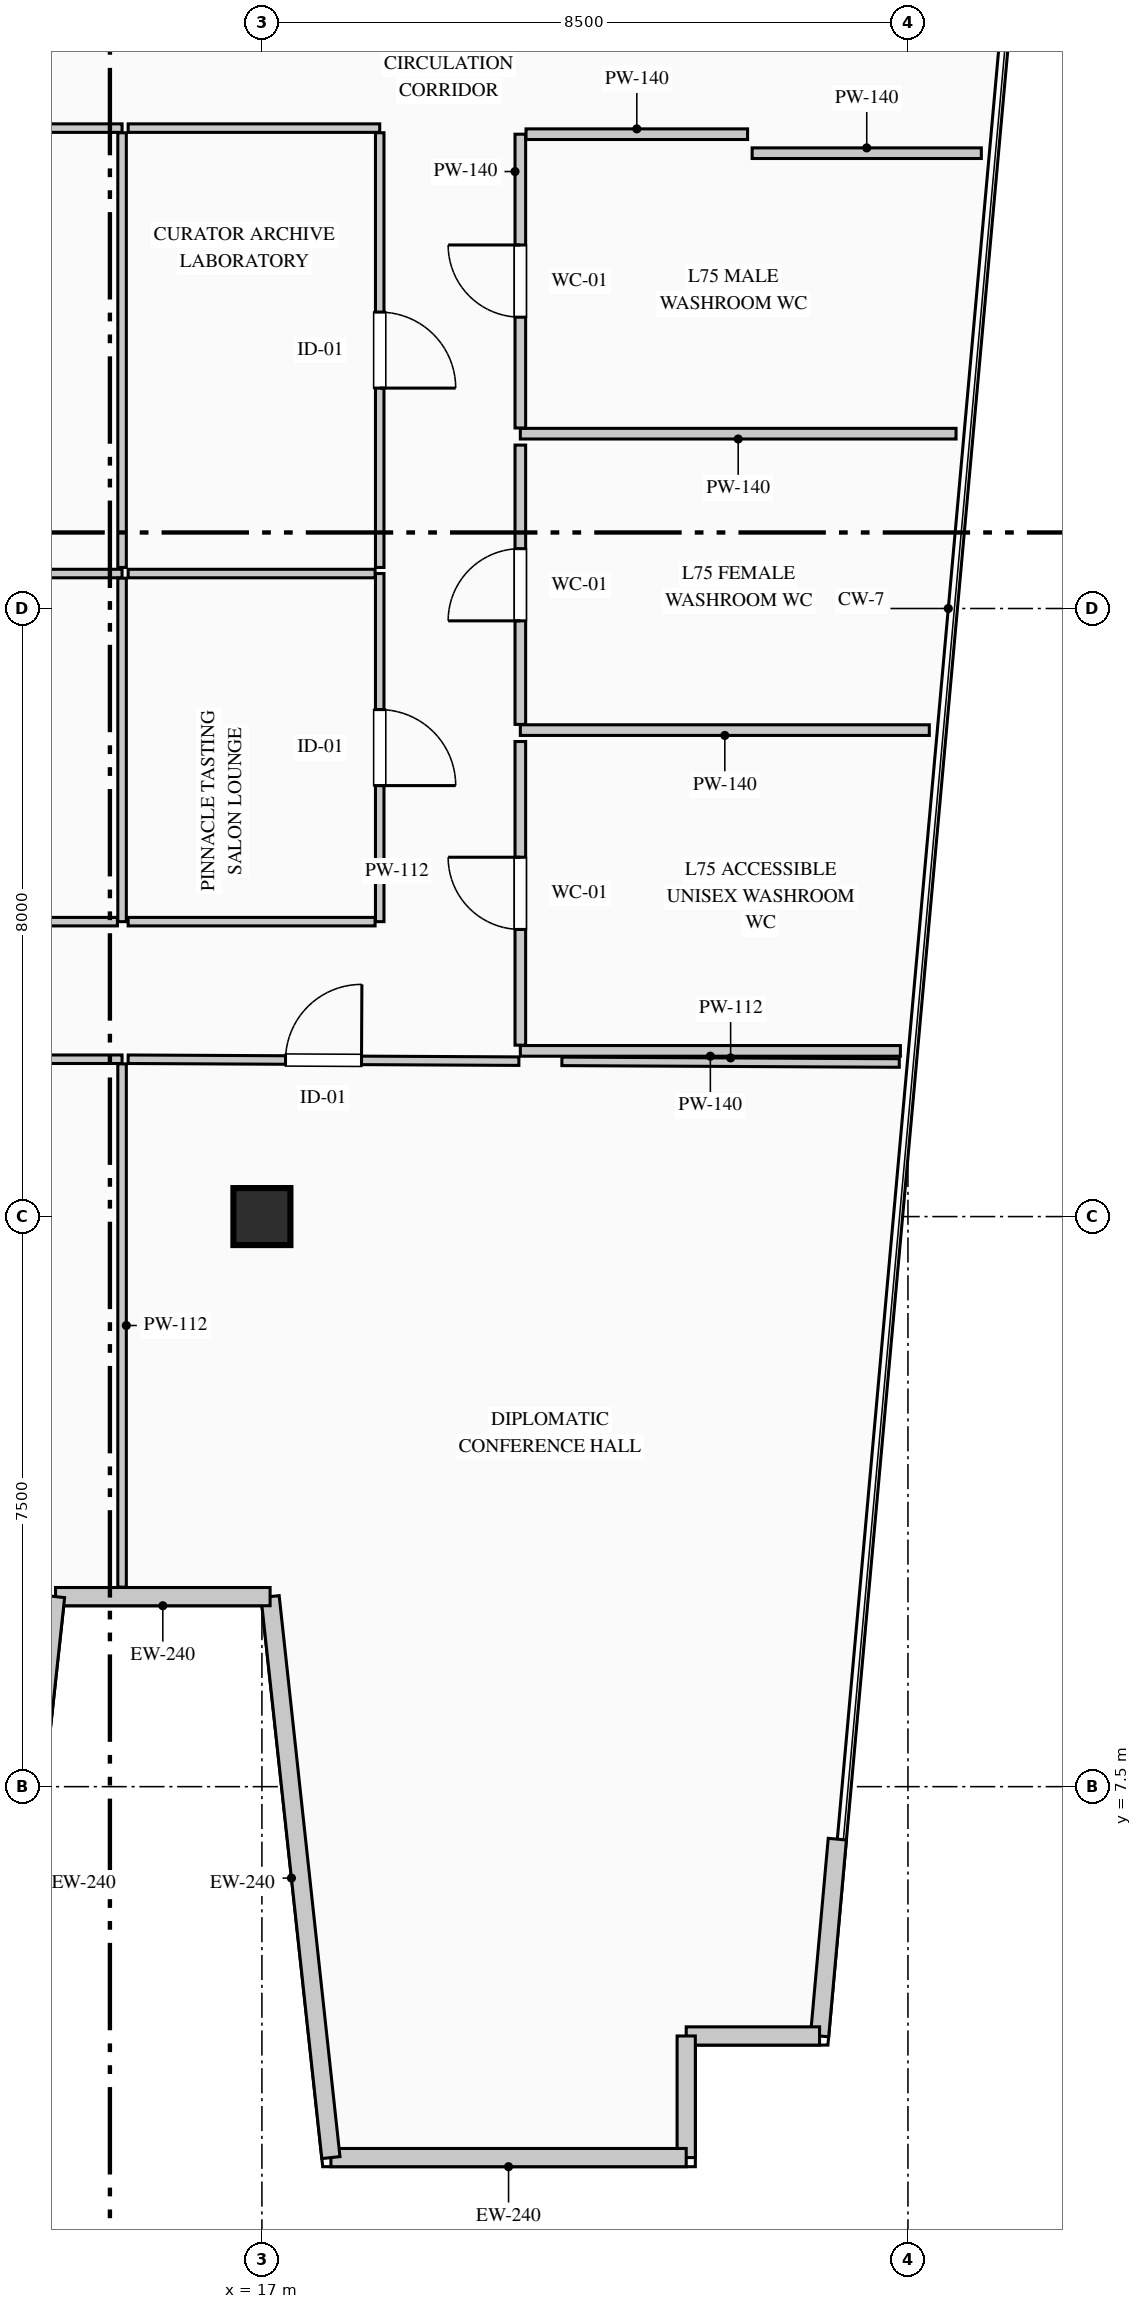
"""IFC4 building model, lengths in metres.
Left out: names, types, materials, properties, quantities, classifications, styles, units other than length and angle.
Written with IfcOpenShell. Run it as: python <this file> out.ifc"""

import sys

from ifc_helpers import new_model, si_unit, direction, frame, frame_2d, origin, origin_2d, place, context, subcontext, project, spatial, rectangle, extrude, element, fill, save


model = new_model("IFC4")
c1 = context("Model", 3, precision=1e-05, world=origin(), true_north=direction((0.0, 1.0)))
c2 = subcontext(c1, "Body", "Model", "MODEL_VIEW")
j1 = project(units=[si_unit("LENGTHUNIT", "METRE"), si_unit("PLANEANGLEUNIT", "RADIAN")], contexts=[c1])
p1 = place(None, origin())
s1 = spatial("IfcSite", under=j1, at=p1, CompositionType="ELEMENT")
p2 = place(p1, origin())
s2 = spatial("IfcBuilding", under=s1, at=p2, CompositionType="ELEMENT")
p3 = place(p2, frame((0.0, 0.0, 312.0)))
s3 = spatial("IfcBuildingStorey", under=s2, at=p3, CompositionType="ELEMENT", Elevation=312.0)
p4 = place(p3, frame((17.0, 15.0, 0.0), z_axis=(0.0, 0.0, 1.0), x_axis=(1.0, 0.0, 0.0)))
e1 = element("IfcColumn", 1, at=p4, inside=s3, PredefinedType="COLUMN", context=c2, shape_type="SweptSolid", body=[
    extrude(rectangle(XDim=0.75, YDim=0.75, at=origin_2d()), origin(), (0.0, 0.0, 1.0), 3.95),
])
p5 = place(p3, frame((24.571, 6.81, 0.0), z_axis=(0.0, 0.0, 1.0), x_axis=(-0.089765303723, -0.995962946222, 0.0)))
e2 = element("IfcWall", 2, at=p5, inside=s3, PredefinedType="STANDARD", context=c2, shape_type="SweptSolid", body=[
    extrude(rectangle(XDim=2.6, YDim=0.24, at=frame_2d((1.3, 0.0))), origin(), (0.0, 0.0, 1.0), 3.7),
])
p6 = place(p3, frame((24.337, 4.22, 0.0), z_axis=(0.0, 0.0, 1.0), x_axis=(-1.0, 0.0, 0.0)))
e3 = element("IfcWall", 3, at=p6, inside=s3, PredefinedType="STANDARD", context=c2, shape_type="SweptSolid", body=[
    extrude(rectangle(XDim=1.755, YDim=0.24, at=frame_2d((0.877, 0.0))), origin(), (0.0, 0.0, 1.0), 3.7),
])
p7 = place(p3, frame((22.583, 4.22, 0.0), z_axis=(0.0, 0.0, 1.0), x_axis=(0.0, -1.0, 0.0)))
e4 = element("IfcWall", 4, at=p7, inside=s3, PredefinedType="STANDARD", context=c2, shape_type="SweptSolid", body=[
    extrude(rectangle(XDim=1.6, YDim=0.24, at=frame_2d((0.8, 0.0))), origin(), (0.0, 0.0, 1.0), 3.7),
])
p8 = place(p3, frame((22.583, 2.62, 0.0), z_axis=(0.0, 0.0, 1.0), x_axis=(-1.0, 0.0, 0.0)))
e5 = element("IfcWall", 5, at=p8, inside=s3, PredefinedType="STANDARD", context=c2, shape_type="SweptSolid", body=[
    extrude(rectangle(XDim=4.675, YDim=0.24, at=frame_2d((2.337, 0.0))), origin(), (0.0, 0.0, 1.0), 3.7),
])
p9 = place(p3, frame((17.908, 2.62, 0.0), z_axis=(0.0, 0.0, 1.0), x_axis=(-0.107777936076, 0.994174992894, 0.0)))
e6 = element("IfcWall", 6, at=p9, inside=s3, PredefinedType="STANDARD", context=c2, shape_type="SweptSolid", body=[
    extrude(rectangle(XDim=7.423, YDim=0.24, at=frame_2d((3.711, 0.0))), origin(), (0.0, 0.0, 1.0), 3.7),
])
p10 = place(p3, frame((17.108, 10.0, 0.0), z_axis=(0.0, 0.0, 1.0), x_axis=(-1.0, 0.0, 0.0)))
e7 = element("IfcWall", 7, at=p10, inside=s3, PredefinedType="STANDARD", context=c2, shape_type="SweptSolid", body=[
    extrude(rectangle(XDim=2.823, YDim=0.24, at=frame_2d((1.411, 0.0))), origin(), (0.0, 0.0, 1.0), 3.7),
])
p11 = place(p3, frame((14.285, 10.0, 0.0), z_axis=(0.0, 0.0, 1.0), x_axis=(-0.107777936076, -0.994174992894, 0.0)))
e8 = element("IfcWall", 8, at=p11, inside=s3, PredefinedType="STANDARD", context=c2, shape_type="SweptSolid", body=[
    extrude(rectangle(XDim=7.423, YDim=0.24, at=frame_2d((3.711, 0.0))), origin(), (0.0, 0.0, 1.0), 3.7),
])
p12 = place(p11, frame((3.926, 0.0, 0.9)))
e9 = element("IfcOpeningElement", 9, at=p12, cuts=e8, PredefinedType="OPENING", context=c2, shape_type="SweptSolid", body=[
    extrude(rectangle(XDim=1.65, YDim=1.95, at=frame_2d((0.825, 0.975))), frame((0.0, 0.13, 0.0), z_axis=(0.0, -1.0, 0.0), x_axis=(1.0, 0.0, 0.0)), (0.0, 0.0, 1.0), 0.26),
])
p13 = place(p3, frame((23.45, 28.99, 0.0), z_axis=(0.0, 0.0, 1.0), x_axis=(1.0, 0.0, 0.0)))
e10 = element("IfcWall", 10, at=p13, inside=s3, PredefinedType="PARTITIONING", context=c2, shape_type="SweptSolid", body=[
    extrude(rectangle(XDim=3.016, YDim=0.14, at=frame_2d((1.508, 0.0))), origin(), (0.0, 0.0, 1.0), 3.7),
])
p14 = place(p3, frame((26.133, 25.3, 0.0), z_axis=(0.0, 0.0, 1.0), x_axis=(-1.0, 0.0, 0.0)))
e11 = element("IfcWall", 11, at=p14, inside=s3, PredefinedType="PARTITIONING", context=c2, shape_type="SweptSolid", body=[
    extrude(rectangle(XDim=5.733, YDim=0.14, at=frame_2d((2.866, 0.0))), origin(), (0.0, 0.0, 1.0), 3.7),
])
p15 = place(p3, frame((20.4, 25.375, 0.0), z_axis=(0.0, 0.0, 1.0), x_axis=(0.0, 1.0, 0.0)))
e12 = element("IfcWall", 12, at=p15, inside=s3, PredefinedType="PARTITIONING", context=c2, shape_type="SweptSolid", body=[
    extrude(rectangle(XDim=3.865, YDim=0.14, at=frame_2d((1.933, 0.0))), origin(), (0.0, 0.0, 1.0), 3.7),
])
p16 = place(p15, frame((1.458, 0.0, 0.0)))
e13 = element("IfcOpeningElement", 13, at=p16, cuts=e12, PredefinedType="OPENING", context=c2, shape_type="SweptSolid", body=[
    extrude(rectangle(XDim=0.95, YDim=2.15, at=frame_2d((0.475, 1.075))), frame((0.0, 0.08, 0.0), z_axis=(0.0, -1.0, 0.0), x_axis=(1.0, 0.0, 0.0)), (0.0, 0.0, 1.0), 0.16),
])
p17 = place(p3, frame((20.475, 29.24, 0.0), z_axis=(0.0, 0.0, 1.0), x_axis=(1.0, 0.0, 0.0)))
e14 = element("IfcWall", 14, at=p17, inside=s3, PredefinedType="PARTITIONING", context=c2, shape_type="SweptSolid", body=[
    extrude(rectangle(XDim=2.915, YDim=0.14, at=frame_2d((1.458, 0.0))), origin(), (0.0, 0.0, 1.0), 3.7),
])
p18 = place(p3, frame((25.781, 21.4, 0.0), z_axis=(0.0, 0.0, 1.0), x_axis=(-1.0, 0.0, 0.0)))
e15 = element("IfcWall", 15, at=p18, inside=s3, PredefinedType="PARTITIONING", context=c2, shape_type="SweptSolid", body=[
    extrude(rectangle(XDim=5.381, YDim=0.14, at=frame_2d((2.69, 0.0))), origin(), (0.0, 0.0, 1.0), 3.7),
])
p19 = place(p3, frame((20.4, 21.475, 0.0), z_axis=(0.0, 0.0, 1.0), x_axis=(0.0, 1.0, 0.0)))
e16 = element("IfcWall", 16, at=p19, inside=s3, PredefinedType="PARTITIONING", context=c2, shape_type="SweptSolid", body=[
    extrude(rectangle(XDim=3.675, YDim=0.14, at=frame_2d((1.837, 0.0))), origin(), (0.0, 0.0, 1.0), 3.7),
])
p20 = place(p19, frame((1.363, 0.0, 0.0)))
e17 = element("IfcOpeningElement", 17, at=p20, cuts=e16, PredefinedType="OPENING", context=c2, shape_type="SweptSolid", body=[
    extrude(rectangle(XDim=0.95, YDim=2.15, at=frame_2d((0.475, 1.075))), frame((0.0, 0.08, 0.0), z_axis=(0.0, -1.0, 0.0), x_axis=(1.0, 0.0, 0.0)), (0.0, 0.0, 1.0), 0.16),
])
p21 = place(p3, frame((25.4, 17.18, 0.0), z_axis=(0.0, 0.0, 1.0), x_axis=(-1.0, 0.0, 0.0)))
e18 = element("IfcWall", 18, at=p21, inside=s3, PredefinedType="PARTITIONING", context=c2, shape_type="SweptSolid", body=[
    extrude(rectangle(XDim=5.0, YDim=0.14, at=frame_2d((2.5, 0.0))), origin(), (0.0, 0.0, 1.0), 3.7),
])
p22 = place(p3, frame((20.4, 17.255, 0.0), z_axis=(0.0, 0.0, 1.0), x_axis=(0.0, 1.0, 0.0)))
e19 = element("IfcWall", 19, at=p22, inside=s3, PredefinedType="PARTITIONING", context=c2, shape_type="SweptSolid", body=[
    extrude(rectangle(XDim=3.995, YDim=0.14, at=frame_2d((1.998, 0.0))), origin(), (0.0, 0.0, 1.0), 3.7),
])
p23 = place(p22, frame((1.522, 0.0, 0.0)))
e20 = element("IfcOpeningElement", 20, at=p23, cuts=e19, PredefinedType="OPENING", context=c2, shape_type="SweptSolid", body=[
    extrude(rectangle(XDim=0.95, YDim=2.15, at=frame_2d((0.475, 1.075))), frame((0.0, 0.08, 0.0), z_axis=(0.0, -1.0, 0.0), x_axis=(1.0, 0.0, 0.0)), (0.0, 0.0, 1.0), 0.16),
])
p24 = place(p3, frame((4.451, 17.07, 0.0), z_axis=(0.0, 0.0, 1.0), x_axis=(1.0, 0.0, 0.0)))
e21 = element("IfcWall", 21, at=p24, inside=s3, PredefinedType="PARTITIONING", context=c2, shape_type="SweptSolid", body=[
    extrude(rectangle(XDim=10.708, YDim=0.112, at=frame_2d((5.354, 0.0))), origin(), (0.0, 0.0, 1.0), 3.7),
])
p25 = place(p24, frame((4.854, 0.0, 0.0)))
e22 = element("IfcOpeningElement", 22, at=p25, cuts=e21, PredefinedType="OPENING", context=c2, shape_type="SweptSolid", body=[
    extrude(rectangle(XDim=1.0, YDim=2.15, at=frame_2d((0.5, 1.075))), frame((0.0, 0.066, 0.0), z_axis=(0.0, -1.0, 0.0), x_axis=(1.0, 0.0, 0.0)), (0.0, 0.0, 1.0), 0.132),
])
p26 = place(p3, frame((15.16, 17.009, 0.0), z_axis=(0.0, 0.0, 1.0), x_axis=(0.0, -1.0, 0.0)))
e23 = element("IfcWall", 23, at=p26, inside=s3, PredefinedType="PARTITIONING", context=c2, shape_type="SweptSolid", body=[
    extrude(rectangle(XDim=6.884, YDim=0.112, at=frame_2d((3.442, 0.0))), origin(), (0.0, 0.0, 1.0), 3.7),
])
p27 = place(p3, frame((20.947, 17.042, 0.0), z_axis=(0.0, 0.0, 1.0), x_axis=(0.999988019942, -0.004894892409, 0.0)))
e24 = element("IfcWall", 24, at=p27, inside=s3, PredefinedType="PARTITIONING", context=c2, shape_type="SweptSolid", body=[
    extrude(rectangle(XDim=4.439, YDim=0.112, at=frame_2d((2.219, 0.0))), origin(), (0.0, 0.0, 1.0), 3.7),
])
p28 = place(p3, frame((15.24, 17.07, 0.0), z_axis=(0.0, 0.0, 1.0), x_axis=(0.999988036902, -0.0048914265, 0.0)))
e25 = element("IfcWall", 25, at=p28, inside=s3, PredefinedType="PARTITIONING", context=c2, shape_type="SweptSolid", body=[
    extrude(rectangle(XDim=5.141, YDim=0.112, at=frame_2d((2.57, 0.0))), origin(), (0.0, 0.0, 1.0), 3.7),
])
p29 = place(p28, frame((2.071, 0.0, 0.0)))
e26 = element("IfcOpeningElement", 26, at=p29, cuts=e25, PredefinedType="OPENING", context=c2, shape_type="SweptSolid", body=[
    extrude(rectangle(XDim=1.0, YDim=2.15, at=frame_2d((0.5, 1.075))), frame((0.0, 0.066, 0.0), z_axis=(0.0, -1.0, 0.0), x_axis=(1.0, 0.0, 0.0)), (0.0, 0.0, 1.0), 0.132),
])
p30 = place(p3, frame((6.171, 23.46, 0.0), z_axis=(0.0, 0.0, 1.0), x_axis=(1.0, 0.0, 0.0)))
e27 = element("IfcWall", 27, at=p30, inside=s3, PredefinedType="PARTITIONING", context=c2, shape_type="SweptSolid", body=[
    extrude(rectangle(XDim=8.989, YDim=0.112, at=frame_2d((4.495, 0.0))), origin(), (0.0, 0.0, 1.0), 3.7),
])
p31 = place(p3, frame((15.16, 23.399, 0.0), z_axis=(0.0, 0.0, 1.0), x_axis=(0.0, -1.0, 0.0)))
e28 = element("IfcWall", 28, at=p31, inside=s3, PredefinedType="PARTITIONING", context=c2, shape_type="SweptSolid", body=[
    extrude(rectangle(XDim=4.519, YDim=0.112, at=frame_2d((2.26, 0.0))), origin(), (0.0, 0.0, 1.0), 3.7),
])
p32 = place(p3, frame((15.099, 18.88, 0.0), z_axis=(0.0, 0.0, 1.0), x_axis=(-1.0, 0.0, 0.0)))
e29 = element("IfcWall", 29, at=p32, inside=s3, PredefinedType="PARTITIONING", context=c2, shape_type="SweptSolid", body=[
    extrude(rectangle(XDim=8.928, YDim=0.112, at=frame_2d((4.464, 0.0))), origin(), (0.0, 0.0, 1.0), 3.7),
])
p33 = place(p32, frame((3.964, 0.0, 0.0)))
e30 = element("IfcOpeningElement", 30, at=p33, cuts=e29, PredefinedType="OPENING", context=c2, shape_type="SweptSolid", body=[
    extrude(rectangle(XDim=1.0, YDim=2.15, at=frame_2d((0.5, 1.075))), frame((0.0, 0.066, 0.0), z_axis=(0.0, -1.0, 0.0), x_axis=(1.0, 0.0, 0.0)), (0.0, 0.0, 1.0), 0.132),
])
p34 = place(p3, frame((18.55, 23.46, 0.0), z_axis=(0.0, 0.0, 1.0), x_axis=(0.0, -1.0, 0.0)))
e31 = element("IfcWall", 31, at=p34, inside=s3, PredefinedType="PARTITIONING", context=c2, shape_type="SweptSolid", body=[
    extrude(rectangle(XDim=4.58, YDim=0.112, at=frame_2d((2.29, 0.0))), origin(), (0.0, 0.0, 1.0), 3.7),
])
p35 = place(p34, frame((1.79, 0.0, 0.0)))
e32 = element("IfcOpeningElement", 32, at=p35, cuts=e31, PredefinedType="OPENING", context=c2, shape_type="SweptSolid", body=[
    extrude(rectangle(XDim=1.0, YDim=2.15, at=frame_2d((0.5, 1.075))), frame((0.0, 0.066, 0.0), z_axis=(0.0, -1.0, 0.0), x_axis=(1.0, 0.0, 0.0)), (0.0, 0.0, 1.0), 0.132),
])
for number, where, z_axis, x_axis in (
    (33, (18.489, 18.88, 0.0), (0.0, 0.0, 1.0), (-1.0, 0.0, 0.0)),
    (34, (15.24, 23.46, 0.0), (0.0, 0.0, 1.0), (1.0, 0.0, 0.0)),
):
    element("IfcWall", number, at=place(p3, frame(where, z_axis=z_axis, x_axis=x_axis)), inside=s3, PredefinedType="PARTITIONING", context=c2, shape_type="SweptSolid", body=[
        extrude(rectangle(XDim=3.249, YDim=0.112, at=frame_2d((1.625, 0.0))), origin(), (0.0, 0.0, 1.0), 3.7),
    ])
p36 = place(p3, frame((6.171, 29.32, 0.0), z_axis=(0.0, 0.0, 1.0), x_axis=(1.0, 0.0, 0.0)))
e35 = element("IfcWall", 35, at=p36, inside=s3, PredefinedType="PARTITIONING", context=c2, shape_type="SweptSolid", body=[
    extrude(rectangle(XDim=8.989, YDim=0.112, at=frame_2d((4.495, 0.0))), origin(), (0.0, 0.0, 1.0), 3.7),
])
p37 = place(p36, frame((3.994, 0.0, 0.0)))
e36 = element("IfcOpeningElement", 36, at=p37, cuts=e35, PredefinedType="OPENING", context=c2, shape_type="SweptSolid", body=[
    extrude(rectangle(XDim=1.0, YDim=2.15, at=frame_2d((0.5, 1.075))), frame((0.0, 0.066, 0.0), z_axis=(0.0, -1.0, 0.0), x_axis=(1.0, 0.0, 0.0)), (0.0, 0.0, 1.0), 0.132),
])
p38 = place(p3, frame((15.16, 29.259, 0.0), z_axis=(0.0, 0.0, 1.0), x_axis=(0.0, -1.0, 0.0)))
e37 = element("IfcWall", 37, at=p38, inside=s3, PredefinedType="PARTITIONING", context=c2, shape_type="SweptSolid", body=[
    extrude(rectangle(XDim=5.719, YDim=0.112, at=frame_2d((2.859, 0.0))), origin(), (0.0, 0.0, 1.0), 3.7),
])
p39 = place(p3, frame((15.24, 29.32, 0.0), z_axis=(0.0, 0.0, 1.0), x_axis=(1.0, 0.0, 0.0)))
e38 = element("IfcWall", 38, at=p39, inside=s3, PredefinedType="PARTITIONING", context=c2, shape_type="SweptSolid", body=[
    extrude(rectangle(XDim=3.31, YDim=0.112, at=frame_2d((1.655, 0.0))), origin(), (0.0, 0.0, 1.0), 3.7),
])
p40 = place(p3, frame((18.55, 29.259, 0.0), z_axis=(0.0, 0.0, 1.0), x_axis=(0.0, -1.0, 0.0)))
e39 = element("IfcWall", 39, at=p40, inside=s3, PredefinedType="PARTITIONING", context=c2, shape_type="SweptSolid", body=[
    extrude(rectangle(XDim=5.719, YDim=0.112, at=frame_2d((2.859, 0.0))), origin(), (0.0, 0.0, 1.0), 3.7),
])
p41 = place(p40, frame((2.36, 0.0, 0.0)))
e40 = element("IfcOpeningElement", 40, at=p41, cuts=e39, PredefinedType="OPENING", context=c2, shape_type="SweptSolid", body=[
    extrude(rectangle(XDim=1.0, YDim=2.15, at=frame_2d((0.5, 1.075))), frame((0.0, 0.066, 0.0), z_axis=(0.0, -1.0, 0.0), x_axis=(1.0, 0.0, 0.0)), (0.0, 0.0, 1.0), 0.132),
])
p42 = place(p16, origin())
e41 = element("IfcDoor", 41, at=p42, inside=s3, OperationType="SINGLE_SWING_RIGHT", PredefinedType="DOOR", context=c2, shape_type="SweptSolid", body=[
    extrude(rectangle(XDim=0.95, YDim=2.15, at=frame_2d((0.475, 1.075))), frame((0.0, 0.025, 0.0), z_axis=(0.0, -1.0, 0.0), x_axis=(1.0, 0.0, 0.0)), (0.0, 0.0, 1.0), 0.05),
])
fill(e13, e41)
p43 = place(p20, origin())
e42 = element("IfcDoor", 42, at=p43, inside=s3, OperationType="SINGLE_SWING_LEFT", PredefinedType="DOOR", context=c2, shape_type="SweptSolid", body=[
    extrude(rectangle(XDim=0.95, YDim=2.15, at=frame_2d((0.475, 1.075))), frame((0.0, 0.025, 0.0), z_axis=(0.0, -1.0, 0.0), x_axis=(1.0, 0.0, 0.0)), (0.0, 0.0, 1.0), 0.05),
])
fill(e17, e42)
p44 = place(p23, origin())
e43 = element("IfcDoor", 43, at=p44, inside=s3, OperationType="SINGLE_SWING_RIGHT", PredefinedType="DOOR", context=c2, shape_type="SweptSolid", body=[
    extrude(rectangle(XDim=0.95, YDim=2.15, at=frame_2d((0.475, 1.075))), frame((0.0, 0.025, 0.0), z_axis=(0.0, -1.0, 0.0), x_axis=(1.0, 0.0, 0.0)), (0.0, 0.0, 1.0), 0.05),
])
fill(e20, e43)
p45 = place(p29, origin())
e44 = element("IfcDoor", 44, at=p45, inside=s3, OperationType="SINGLE_SWING_RIGHT", PredefinedType="DOOR", context=c2, shape_type="SweptSolid", body=[
    extrude(rectangle(XDim=1.0, YDim=2.15, at=frame_2d((0.5, 1.075))), frame((0.0, 0.025, 0.0), z_axis=(0.0, -1.0, 0.0), x_axis=(1.0, 0.0, 0.0)), (0.0, 0.0, 1.0), 0.05),
])
fill(e26, e44)
p46 = place(p35, origin())
e45 = element("IfcDoor", 45, at=p46, inside=s3, OperationType="SINGLE_SWING_RIGHT", PredefinedType="DOOR", context=c2, shape_type="SweptSolid", body=[
    extrude(rectangle(XDim=1.0, YDim=2.15, at=frame_2d((0.5, 1.075))), frame((0.0, 0.025, 0.0), z_axis=(0.0, -1.0, 0.0), x_axis=(1.0, 0.0, 0.0)), (0.0, 0.0, 1.0), 0.05),
])
fill(e32, e45)
p47 = place(p41, origin())
e46 = element("IfcDoor", 46, at=p47, inside=s3, OperationType="SINGLE_SWING_RIGHT", PredefinedType="DOOR", context=c2, shape_type="SweptSolid", body=[
    extrude(rectangle(XDim=1.0, YDim=2.15, at=frame_2d((0.5, 1.075))), frame((0.0, 0.025, 0.0), z_axis=(0.0, -1.0, 0.0), x_axis=(1.0, 0.0, 0.0)), (0.0, 0.0, 1.0), 0.05),
])
fill(e40, e46)
save(model, sys.argv[1])
